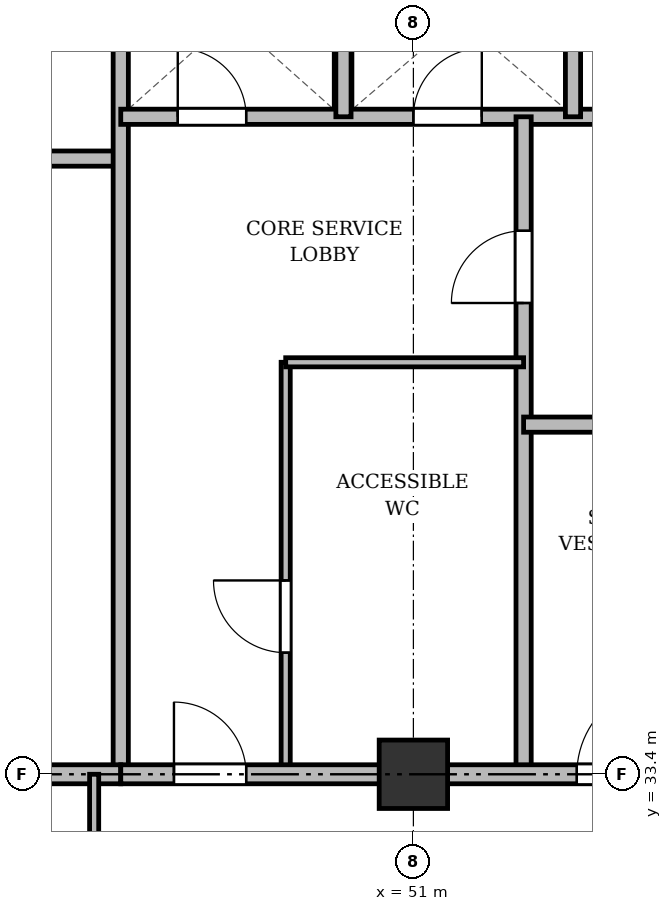
"""IFC4 building model, lengths in metres.
Left out: names, types, materials, properties, quantities, classifications, styles, units other than length and angle.
Written with IfcOpenShell. Run it as: python <this file> out.ifc"""

import sys

from ifc_helpers import new_model, si_unit, direction, frame, frame_2d, origin, origin_2d, place, context, subcontext, project, spatial, rectangle, extrude, source, transform, mapped, element, fill, save


model = new_model("IFC4")
c1 = context("Model", 3, precision=1e-05, world=origin(), true_north=direction((0.0, 1.0)))
c2 = subcontext(c1, "Body", "Model", "MODEL_VIEW")
j1 = project(units=[si_unit("LENGTHUNIT", "METRE"), si_unit("PLANEANGLEUNIT", "RADIAN")], contexts=[c1])
p1 = place(None, origin())
s1 = spatial("IfcSite", under=j1, at=p1, CompositionType="ELEMENT")
p2 = place(p1, origin())
s2 = spatial("IfcBuilding", under=s1, at=p2, CompositionType="ELEMENT")
p3 = place(p2, frame((0.0, 0.0, 27.1)))
s3 = spatial("IfcBuildingStorey", under=s2, at=p3, CompositionType="ELEMENT", Elevation=27.1)
m1 = source(origin(), c2, "Body", "SweptSolid", [
    extrude(rectangle(XDim=0.9, YDim=0.9, at=origin_2d()), origin(), (0.0, 0.0, 1.0), 3.6),
])
p4 = place(p3, frame((51.0, 33.4, 0.0), z_axis=(0.0, 0.0, 1.0), x_axis=(1.0, 0.0, 0.0)))
e1 = element("IfcColumn", 1, at=p4, inside=s3, PredefinedType="COLUMN", context=c2, shape_type="MappedRepresentation", body=[
    mapped(m1, transform((0.0, 0.0, 0.0), x_axis=(1.0, 0.0, 0.0), y_axis=(0.0, 1.0, 0.0), z_axis=(0.0, 0.0, 1.0), scale=1.0)),
])
p5 = place(p3, frame((40.25, 41.5, 0.0), z_axis=(0.0, 0.0, 1.0), x_axis=(1.0, 0.0, 0.0)))
e2 = element("IfcWall", 2, at=p5, inside=s3, PredefinedType="SOLIDWALL", context=c2, shape_type="SweptSolid", body=[
    extrude(rectangle(XDim=6.9, YDim=0.2, at=frame_2d((3.45, 0.0))), origin(), (0.0, 0.0, 1.0), 2.752),
])
p6 = place(p3, frame((47.15, 33.4, 0.0), z_axis=(0.0, 0.0, 1.0), x_axis=(0.0, 1.0, 0.0)))
e3 = element("IfcWall", 3, at=p6, inside=s3, PredefinedType="SOLIDWALL", context=c2, shape_type="SweptSolid", body=[
    extrude(rectangle(XDim=11.3, YDim=0.2, at=frame_2d((5.65, 0.0))), origin(), (0.0, 0.0, 1.0), 2.69),
])
p7 = place(p3, frame((26.3, 33.4, 0.0), z_axis=(0.0, 0.0, 1.0), x_axis=(1.0, 0.0, 0.0)))
e4 = element("IfcWall", 4, at=p7, inside=s3, PredefinedType="PARTITIONING", context=c2, shape_type="SweptSolid", body=[
    extrude(rectangle(XDim=20.85, YDim=0.25, at=frame_2d((10.425, 0.0))), origin(), (0.0, 0.0, 1.0), 2.69),
])
p8 = place(p7, frame((9.2, 0.0, 0.0)))
e5 = element("IfcOpeningElement", 5, at=p8, cuts=e4, PredefinedType="OPENING", context=c2, shape_type="SweptSolid", body=[
    extrude(rectangle(XDim=1.6, YDim=2.2, at=frame_2d((0.8, 1.1))), frame((0.0, 0.135, 0.0), z_axis=(0.0, -1.0, 0.0), x_axis=(1.0, 0.0, 0.0)), (0.0, 0.0, 1.0), 0.27),
])
p9 = place(p3, frame((47.15, 42.05, 0.0), z_axis=(0.0, 0.0, 1.0), x_axis=(1.0, 0.0, 0.0)))
e6 = element("IfcWall", 6, at=p9, inside=s3, PredefinedType="SOLIDWALL", context=c2, shape_type="SweptSolid", body=[
    extrude(rectangle(XDim=7.85, YDim=0.2, at=frame_2d((3.925, 0.0))), origin(), (0.0, 0.0, 1.0), 2.752),
])
p10 = place(p9, frame((0.75, 0.0, 0.0)))
e7 = element("IfcOpeningElement", 7, at=p10, cuts=e6, PredefinedType="OPENING", context=c2, shape_type="SweptSolid", body=[
    extrude(rectangle(XDim=0.9, YDim=2.1, at=frame_2d((0.45, 1.05))), frame((0.0, 0.11, 0.0), z_axis=(0.0, -1.0, 0.0), x_axis=(1.0, 0.0, 0.0)), (0.0, 0.0, 1.0), 0.22),
])
p11 = place(p9, frame((3.85, 0.0, 0.0)))
e8 = element("IfcOpeningElement", 8, at=p11, cuts=e6, PredefinedType="OPENING", context=c2, shape_type="SweptSolid", body=[
    extrude(rectangle(XDim=0.9, YDim=2.1, at=frame_2d((0.45, 1.05))), frame((0.0, 0.11, 0.0), z_axis=(0.0, -1.0, 0.0), x_axis=(1.0, 0.0, 0.0)), (0.0, 0.0, 1.0), 0.22),
])
for number, where, z_axis, x_axis in (
    (9, (50.08, 42.05, 0.0), (0.0, 0.0, 1.0), (0.0, 1.0, 0.0)),
    (10, (53.1, 42.05, 0.0), (0.0, 0.0, 1.0), (0.0, 1.0, 0.0)),
):
    element("IfcWall", number, at=place(p3, frame(where, z_axis=z_axis, x_axis=x_axis)), inside=s3, PredefinedType="SOLIDWALL", context=c2, shape_type="SweptSolid", body=[
        extrude(rectangle(XDim=2.65, YDim=0.2, at=frame_2d((1.325, 0.0))), origin(), (0.0, 0.0, 1.0), 3.34),
    ])
p12 = place(p3, frame((52.45, 33.4, 0.0), z_axis=(0.0, 0.0, 1.0), x_axis=(0.0, 1.0, 0.0)))
e11 = element("IfcWall", 11, at=p12, inside=s3, PredefinedType="PARTITIONING", context=c2, shape_type="SweptSolid", body=[
    extrude(rectangle(XDim=8.65, YDim=0.2, at=frame_2d((4.325, 0.0))), origin(), (0.0, 0.0, 1.0), 2.69),
])
p13 = place(p12, frame((6.2, 0.0, 0.0)))
e12 = element("IfcOpeningElement", 12, at=p13, cuts=e11, PredefinedType="OPENING", context=c2, shape_type="SweptSolid", body=[
    extrude(rectangle(XDim=0.95, YDim=2.15, at=frame_2d((0.475, 1.075))), frame((0.0, 0.11, 0.0), z_axis=(0.0, -1.0, 0.0), x_axis=(1.0, 0.0, 0.0)), (0.0, 0.0, 1.0), 0.22),
])
p14 = place(p3, frame((52.45, 38.0, 0.0), z_axis=(0.0, 0.0, 1.0), x_axis=(1.0, 0.0, 0.0)))
e13 = element("IfcWall", 13, at=p14, inside=s3, PredefinedType="PARTITIONING", context=c2, shape_type="SweptSolid", body=[
    extrude(rectangle(XDim=2.55, YDim=0.2, at=frame_2d((1.275, 0.0))), origin(), (0.0, 0.0, 1.0), 3.34),
])
p15 = place(p3, frame((49.32, 33.4, 0.0), z_axis=(0.0, 0.0, 1.0), x_axis=(0.0, 1.0, 0.0)))
e14 = element("IfcWall", 14, at=p15, inside=s3, PredefinedType="PARTITIONING", context=c2, shape_type="SweptSolid", body=[
    extrude(rectangle(XDim=5.42, YDim=0.12, at=frame_2d((2.71, 0.0))), origin(), (0.0, 0.0, 1.0), 2.69),
])
p16 = place(p15, frame((1.6, 0.0, 0.0)))
e15 = element("IfcOpeningElement", 15, at=p16, cuts=e14, PredefinedType="OPENING", context=c2, shape_type="SweptSolid", body=[
    extrude(rectangle(XDim=0.95, YDim=2.15, at=frame_2d((0.475, 1.075))), frame((0.0, 0.07, 0.0), z_axis=(0.0, -1.0, 0.0), x_axis=(1.0, 0.0, 0.0)), (0.0, 0.0, 1.0), 0.14),
])
p17 = place(p3, frame((49.32, 38.82, 0.0), z_axis=(0.0, 0.0, 1.0), x_axis=(1.0, 0.0, 0.0)))
e16 = element("IfcWall", 16, at=p17, inside=s3, PredefinedType="PARTITIONING", context=c2, shape_type="SweptSolid", body=[
    extrude(rectangle(XDim=3.13, YDim=0.12, at=frame_2d((1.565, 0.0))), origin(), (0.0, 0.0, 1.0), 2.752),
])
p18 = place(p3, frame((47.15, 33.4, 0.0), z_axis=(0.0, 0.0, 1.0), x_axis=(1.0, 0.0, 0.0)))
e17 = element("IfcWall", 17, at=p18, inside=s3, PredefinedType="PARTITIONING", context=c2, shape_type="SweptSolid", body=[
    extrude(rectangle(XDim=11.15, YDim=0.25, at=frame_2d((5.575, 0.0))), origin(), (0.0, 0.0, 1.0), 2.69),
])
p19 = place(p18, frame((0.7, 0.0, 0.0)))
e18 = element("IfcOpeningElement", 18, at=p19, cuts=e17, PredefinedType="OPENING", context=c2, shape_type="SweptSolid", body=[
    extrude(rectangle(XDim=0.95, YDim=2.15, at=frame_2d((0.475, 1.075))), frame((0.0, 0.135, 0.0), z_axis=(0.0, -1.0, 0.0), x_axis=(1.0, 0.0, 0.0)), (0.0, 0.0, 1.0), 0.27),
])
p20 = place(p18, frame((6.0, 0.0, 0.0)))
e19 = element("IfcOpeningElement", 19, at=p20, cuts=e17, PredefinedType="OPENING", context=c2, shape_type="SweptSolid", body=[
    extrude(rectangle(XDim=1.2, YDim=2.15, at=frame_2d((0.6, 1.075))), frame((0.0, 0.135, 0.0), z_axis=(0.0, -1.0, 0.0), x_axis=(1.0, 0.0, 0.0)), (0.0, 0.0, 1.0), 0.27),
])
p21 = place(p3, frame((46.8, 29.8, 0.0), z_axis=(0.0, 0.0, 1.0), x_axis=(0.0, 1.0, 0.0)))
e20 = element("IfcWall", 20, at=p21, inside=s3, PredefinedType="PARTITIONING", context=c2, shape_type="SweptSolid", body=[
    extrude(rectangle(XDim=3.6, YDim=0.12, at=frame_2d((1.8, 0.0))), origin(), (0.0, 0.0, 1.0), 2.69),
])
m2 = source(origin(), c2, "Body", "SweptSolid", [
    extrude(rectangle(XDim=0.9, YDim=2.1, at=frame_2d((0.45, 1.05))), frame((0.0, 0.025, 0.0), z_axis=(0.0, -1.0, 0.0), x_axis=(1.0, 0.0, 0.0)), (0.0, 0.0, 1.0), 0.05),
])
p22 = place(p10, origin())
e21 = element("IfcDoor", 21, at=p22, inside=s3, OperationType="SINGLE_SWING_LEFT", PredefinedType="DOOR", context=c2, shape_type="MappedRepresentation", body=[
    mapped(m2, transform((0.0, 0.0, 0.0), x_axis=(1.0, 0.0, 0.0), y_axis=(0.0, 1.0, 0.0), z_axis=(0.0, 0.0, 1.0), scale=1.0)),
])
fill(e7, e21)
p23 = place(p11, origin())
e22 = element("IfcDoor", 22, at=p23, inside=s3, OperationType="SINGLE_SWING_RIGHT", PredefinedType="DOOR", context=c2, shape_type="MappedRepresentation", body=[
    mapped(m2, transform((0.0, 0.0, 0.0), x_axis=(1.0, 0.0, 0.0), y_axis=(0.0, 1.0, 0.0), z_axis=(0.0, 0.0, 1.0), scale=1.0)),
])
fill(e8, e22)
m3 = source(origin(), c2, "Body", "SweptSolid", [
    extrude(rectangle(XDim=0.95, YDim=2.15, at=frame_2d((0.475, 1.075))), frame((0.0, 0.025, 0.0), z_axis=(0.0, -1.0, 0.0), x_axis=(1.0, 0.0, 0.0)), (0.0, 0.0, 1.0), 0.05),
])
p24 = place(p13, origin())
e23 = element("IfcDoor", 23, at=p24, inside=s3, OperationType="SINGLE_SWING_LEFT", PredefinedType="DOOR", context=c2, shape_type="MappedRepresentation", body=[
    mapped(m3, transform((0.0, 0.0, 0.0), x_axis=(1.0, 0.0, 0.0), y_axis=(0.0, 1.0, 0.0), z_axis=(0.0, 0.0, 1.0), scale=1.0)),
])
fill(e12, e23)
p25 = place(p16, origin())
e24 = element("IfcDoor", 24, at=p25, inside=s3, OperationType="SINGLE_SWING_RIGHT", PredefinedType="DOOR", context=c2, shape_type="MappedRepresentation", body=[
    mapped(m3, transform((0.0, 0.0, 0.0), x_axis=(1.0, 0.0, 0.0), y_axis=(0.0, 1.0, 0.0), z_axis=(0.0, 0.0, 1.0), scale=1.0)),
])
fill(e15, e24)
p26 = place(p19, origin())
e25 = element("IfcDoor", 25, at=p26, inside=s3, OperationType="SINGLE_SWING_LEFT", PredefinedType="DOOR", context=c2, shape_type="MappedRepresentation", body=[
    mapped(m3, transform((0.0, 0.0, 0.0), x_axis=(1.0, 0.0, 0.0), y_axis=(0.0, 1.0, 0.0), z_axis=(0.0, 0.0, 1.0), scale=1.0)),
])
fill(e18, e25)
m4 = source(origin(), c2, "Body", "SweptSolid", [
    extrude(rectangle(XDim=1.2, YDim=2.15, at=frame_2d((0.6, 1.075))), frame((0.0, 0.025, 0.0), z_axis=(0.0, -1.0, 0.0), x_axis=(1.0, 0.0, 0.0)), (0.0, 0.0, 1.0), 0.05),
])
p27 = place(p20, origin())
e26 = element("IfcDoor", 26, at=p27, inside=s3, OperationType="SINGLE_SWING_RIGHT", PredefinedType="DOOR", context=c2, shape_type="MappedRepresentation", body=[
    mapped(m4, transform((0.0, 0.0, 0.0), x_axis=(1.0, 0.0, 0.0), y_axis=(0.0, 1.0, 0.0), z_axis=(0.0, 0.0, 1.0), scale=1.0)),
])
fill(e19, e26)
save(model, sys.argv[1])
